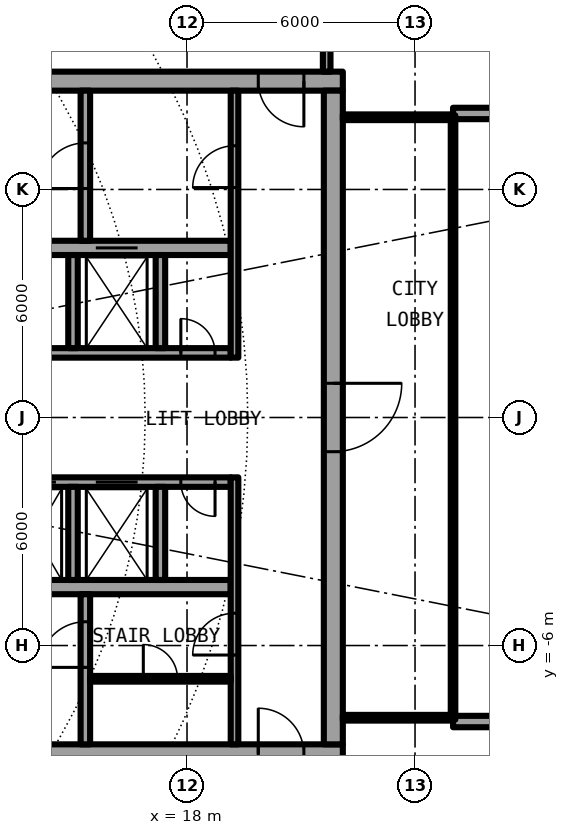
"""IFC4 building model, lengths in metres.
Left out: names, types, materials, properties, quantities, classifications, styles, units other than length and angle.
Written with IfcOpenShell. Run it as: python <this file> out.ifc"""

import sys

from ifc_helpers import new_model, si_unit, direction, frame, frame_2d, origin, place, context, subcontext, project, spatial, rectangle, extrude, element, fill, save


model = new_model("IFC4")
c1 = context("Model", 3, precision=1e-05, world=origin(), true_north=direction((0.0, 1.0)))
c2 = subcontext(c1, "Body", "Model", "MODEL_VIEW")
j1 = project(units=[si_unit("LENGTHUNIT", "METRE"), si_unit("PLANEANGLEUNIT", "RADIAN")], contexts=[c1])
p1 = place(None, origin())
s1 = spatial("IfcSite", under=j1, at=p1, CompositionType="ELEMENT")
p2 = place(p1, origin())
s2 = spatial("IfcBuilding", under=s1, at=p2, CompositionType="ELEMENT")
p3 = place(p2, frame((0.0, 0.0, 170.75)))
s3 = spatial("IfcBuildingStorey", under=s2, at=p3, CompositionType="ELEMENT", Elevation=170.75)
for number, where, z_axis, x_axis in (
    (1, (25.0, 8.0, 0.0), (0.0, 0.0, 1.0), (1.0, 0.0, 0.0)),
    (2, (25.0, -8.0, 0.0), (0.0, 0.0, 1.0), (1.0, 0.0, 0.0)),
):
    element("IfcWall", number, at=place(p3, frame(where, z_axis=z_axis, x_axis=x_axis)), inside=s3, PredefinedType="SOLIDWALL", context=c2, shape_type="SweptSolid", body=[
        extrude(rectangle(XDim=2.667, YDim=0.3, at=frame_2d((1.333, 0.0))), origin(), (0.0, 0.0, 1.0), 2.7),
    ])
p4 = place(p3, frame((22.1, 8.85, 0.0), z_axis=(0.0, 0.0, 1.0), x_axis=(-1.0, 0.0, 0.0)))
e3 = element("IfcWall", 3, at=p4, inside=s3, PredefinedType="SHEAR", context=c2, shape_type="SweptSolid", body=[
    extrude(rectangle(XDim=13.6, YDim=0.5, at=frame_2d((6.8, 0.0))), origin(), (0.0, 0.0, 1.0), 3.05),
])
p5 = place(p4, frame((1.025, 0.0, 0.0)))
e4 = element("IfcOpeningElement", 4, at=p5, cuts=e3, PredefinedType="OPENING", context=c2, shape_type="SweptSolid", body=[
    extrude(rectangle(XDim=1.2, YDim=2.3, at=frame_2d((0.6, 1.15))), frame((0.0, 0.26, 0.0), z_axis=(0.0, -1.0, 0.0), x_axis=(1.0, 0.0, 0.0)), (0.0, 0.0, 1.0), 0.52),
])
p6 = place(p3, frame((8.5, -8.85, 0.0), z_axis=(0.0, 0.0, 1.0), x_axis=(1.0, 0.0, 0.0)))
e5 = element("IfcWall", 5, at=p6, inside=s3, PredefinedType="SHEAR", context=c2, shape_type="SweptSolid", body=[
    extrude(rectangle(XDim=13.6, YDim=0.5, at=frame_2d((6.8, 0.0))), origin(), (0.0, 0.0, 1.0), 3.05),
])
p7 = place(p6, frame((11.375, 0.0, 0.0)))
e6 = element("IfcOpeningElement", 6, at=p7, cuts=e5, PredefinedType="OPENING", context=c2, shape_type="SweptSolid", body=[
    extrude(rectangle(XDim=1.2, YDim=2.3, at=frame_2d((0.6, 1.15))), frame((0.0, 0.26, 0.0), z_axis=(0.0, -1.0, 0.0), x_axis=(1.0, 0.0, 0.0)), (0.0, 0.0, 1.0), 0.52),
])
p8 = place(p3, frame((21.85, 8.6, 0.0), z_axis=(0.0, 0.0, 1.0), x_axis=(0.0, -1.0, 0.0)))
e7 = element("IfcWall", 7, at=p8, inside=s3, PredefinedType="SHEAR", context=c2, shape_type="SweptSolid", body=[
    extrude(rectangle(XDim=17.2, YDim=0.5, at=frame_2d((8.6, 0.0))), origin(), (0.0, 0.0, 1.0), 3.05),
])
p9 = place(p8, frame((7.7, 0.0, 0.0)))
e8 = element("IfcOpeningElement", 8, at=p9, cuts=e7, PredefinedType="OPENING", context=c2, shape_type="SweptSolid", body=[
    extrude(rectangle(XDim=1.8, YDim=2.3, at=frame_2d((0.9, 1.15))), frame((0.0, 0.26, 0.0), z_axis=(0.0, -1.0, 0.0), x_axis=(1.0, 0.0, 0.0)), (0.0, 0.0, 1.0), 0.52),
])
p10 = place(p3, frame((9.0, 1.7, 0.0), z_axis=(0.0, 0.0, 1.0), x_axis=(1.0, 0.0, 0.0)))
e9 = element("IfcWall", 9, at=p10, inside=s3, PredefinedType="SHEAR", context=c2, shape_type="SweptSolid", body=[
    extrude(rectangle(XDim=10.15, YDim=0.25, at=frame_2d((5.075, 0.0))), origin(), (0.0, 0.0, 1.0), 3.05),
])
p11 = place(p10, frame((1.312, 0.0, 0.0)))
e10 = element("IfcOpeningElement", 10, at=p11, cuts=e9, PredefinedType="OPENING", context=c2, shape_type="SweptSolid", body=[
    extrude(rectangle(XDim=0.9, YDim=2.3, at=frame_2d((0.45, 1.15))), frame((0.0, 0.135, 0.0), z_axis=(0.0, -1.0, 0.0), x_axis=(1.0, 0.0, 0.0)), (0.0, 0.0, 1.0), 0.27),
])
p12 = place(p10, frame((4.325, 0.0, 0.0)))
e11 = element("IfcOpeningElement", 11, at=p12, cuts=e9, PredefinedType="OPENING", context=c2, shape_type="SweptSolid", body=[
    extrude(rectangle(XDim=0.9, YDim=2.3, at=frame_2d((0.45, 1.15))), frame((0.0, 0.135, 0.0), z_axis=(0.0, -1.0, 0.0), x_axis=(1.0, 0.0, 0.0)), (0.0, 0.0, 1.0), 0.27),
])
p13 = place(p10, frame((8.837, 0.0, 0.0)))
e12 = element("IfcOpeningElement", 12, at=p13, cuts=e9, PredefinedType="OPENING", context=c2, shape_type="SweptSolid", body=[
    extrude(rectangle(XDim=0.9, YDim=2.3, at=frame_2d((0.45, 1.15))), frame((0.0, 0.135, 0.0), z_axis=(0.0, -1.0, 0.0), x_axis=(1.0, 0.0, 0.0)), (0.0, 0.0, 1.0), 0.27),
])
p14 = place(p3, frame((9.0, 4.462, 0.0), z_axis=(0.0, 0.0, 1.0), x_axis=(1.0, 0.0, 0.0)))
e13 = element("IfcWall", 13, at=p14, inside=s3, PredefinedType="SHEAR", context=c2, shape_type="SweptSolid", body=[
    extrude(rectangle(XDim=10.15, YDim=0.375, at=frame_2d((5.075, 0.0))), origin(), (0.0, 0.0, 1.0), 3.05),
])
p15 = place(p14, frame((6.6, 0.0, 0.0)))
e14 = element("IfcOpeningElement", 14, at=p15, cuts=e13, PredefinedType="OPENING", context=c2, shape_type="SweptSolid", body=[
    extrude(rectangle(XDim=1.1, YDim=2.3, at=frame_2d((0.55, 1.15))), frame((0.0, 0.198, 0.0), z_axis=(0.0, -1.0, 0.0), x_axis=(1.0, 0.0, 0.0)), (0.0, 0.0, 1.0), 0.395),
])
p16 = place(p3, frame((15.325, 4.65, 0.0), z_axis=(0.0, 0.0, 1.0), x_axis=(0.0, 1.0, 0.0)))
e15 = element("IfcWall", 15, at=p16, inside=s3, PredefinedType="SHEAR", context=c2, shape_type="SweptSolid", body=[
    extrude(rectangle(XDim=3.95, YDim=0.25, at=frame_2d((1.975, 0.0))), origin(), (0.0, 0.0, 1.0), 3.05),
])
p17 = place(p16, frame((1.375, 0.0, 0.0)))
e16 = element("IfcOpeningElement", 16, at=p17, cuts=e15, PredefinedType="OPENING", context=c2, shape_type="SweptSolid", body=[
    extrude(rectangle(XDim=1.2, YDim=2.3, at=frame_2d((0.6, 1.15))), frame((0.0, 0.135, 0.0), z_axis=(0.0, -1.0, 0.0), x_axis=(1.0, 0.0, 0.0)), (0.0, 0.0, 1.0), 0.27),
])
for number, where, z_axis, x_axis in (
    (17, (15.0, 1.825, 0.0), (0.0, 0.0, 1.0), (0.0, 1.0, 0.0)),
    (18, (17.3, 1.825, 0.0), (0.0, 0.0, 1.0), (0.0, 1.0, 0.0)),
):
    element("IfcWall", number, at=place(p3, frame(where, z_axis=z_axis, x_axis=x_axis)), inside=s3, PredefinedType="SOLIDWALL", context=c2, shape_type="SweptSolid", body=[
        extrude(rectangle(XDim=2.45, YDim=0.25, at=frame_2d((1.225, 0.0))), origin(), (0.0, 0.0, 1.0), 2.7),
    ])
p18 = place(p3, frame((19.25, 1.575, 0.0), z_axis=(0.0, 0.0, 1.0), x_axis=(0.0, 1.0, 0.0)))
e19 = element("IfcWall", 19, at=p18, inside=s3, PredefinedType="SOLIDWALL", context=c2, shape_type="SweptSolid", body=[
    extrude(rectangle(XDim=7.025, YDim=0.2, at=frame_2d((3.513, 0.0))), origin(), (0.0, 0.0, 1.0), 2.7),
])
p19 = place(p18, frame((4.475, 0.0, 0.0)))
e20 = element("IfcOpeningElement", 20, at=p19, cuts=e19, PredefinedType="OPENING", context=c2, shape_type="SweptSolid", body=[
    extrude(rectangle(XDim=1.1, YDim=2.3, at=frame_2d((0.55, 1.15))), frame((0.0, 0.11, 0.0), z_axis=(0.0, -1.0, 0.0), x_axis=(1.0, 0.0, 0.0)), (0.0, 0.0, 1.0), 0.22),
])
p20 = place(p3, frame((19.15, -1.7, 0.0), z_axis=(0.0, 0.0, 1.0), x_axis=(-1.0, 0.0, 0.0)))
e21 = element("IfcWall", 21, at=p20, inside=s3, PredefinedType="SHEAR", context=c2, shape_type="SweptSolid", body=[
    extrude(rectangle(XDim=10.15, YDim=0.25, at=frame_2d((5.075, 0.0))), origin(), (0.0, 0.0, 1.0), 3.05),
])
p21 = place(p20, frame((8.663, 0.0, 0.0)))
e22 = element("IfcOpeningElement", 22, at=p21, cuts=e21, PredefinedType="OPENING", context=c2, shape_type="SweptSolid", body=[
    extrude(rectangle(XDim=1.1, YDim=2.3, at=frame_2d((0.55, 1.15))), frame((0.0, 0.135, 0.0), z_axis=(0.0, -1.0, 0.0), x_axis=(1.0, 0.0, 0.0)), (0.0, 0.0, 1.0), 0.27),
])
p22 = place(p20, frame((6.6, 0.0, 0.0)))
e23 = element("IfcOpeningElement", 23, at=p22, cuts=e21, PredefinedType="OPENING", context=c2, shape_type="SweptSolid", body=[
    extrude(rectangle(XDim=1.1, YDim=2.3, at=frame_2d((0.55, 1.15))), frame((0.0, 0.135, 0.0), z_axis=(0.0, -1.0, 0.0), x_axis=(1.0, 0.0, 0.0)), (0.0, 0.0, 1.0), 0.27),
])
p23 = place(p20, frame((4.6, 0.0, 0.0)))
e24 = element("IfcOpeningElement", 24, at=p23, cuts=e21, PredefinedType="OPENING", context=c2, shape_type="SweptSolid", body=[
    extrude(rectangle(XDim=1.1, YDim=2.3, at=frame_2d((0.55, 1.15))), frame((0.0, 0.135, 0.0), z_axis=(0.0, -1.0, 0.0), x_axis=(1.0, 0.0, 0.0)), (0.0, 0.0, 1.0), 0.27),
])
p24 = place(p20, frame((2.45, 0.0, 0.0)))
e25 = element("IfcOpeningElement", 25, at=p24, cuts=e21, PredefinedType="OPENING", context=c2, shape_type="SweptSolid", body=[
    extrude(rectangle(XDim=1.1, YDim=2.3, at=frame_2d((0.55, 1.15))), frame((0.0, 0.135, 0.0), z_axis=(0.0, -1.0, 0.0), x_axis=(1.0, 0.0, 0.0)), (0.0, 0.0, 1.0), 0.27),
])
p25 = place(p20, frame((0.413, 0.0, 0.0)))
e26 = element("IfcOpeningElement", 26, at=p25, cuts=e21, PredefinedType="OPENING", context=c2, shape_type="SweptSolid", body=[
    extrude(rectangle(XDim=0.9, YDim=2.3, at=frame_2d((0.45, 1.15))), frame((0.0, 0.135, 0.0), z_axis=(0.0, -1.0, 0.0), x_axis=(1.0, 0.0, 0.0)), (0.0, 0.0, 1.0), 0.27),
])
p26 = place(p3, frame((9.0, -4.462, 0.0), z_axis=(0.0, 0.0, 1.0), x_axis=(1.0, 0.0, 0.0)))
e27 = element("IfcWall", 27, at=p26, inside=s3, PredefinedType="SHEAR", context=c2, shape_type="SweptSolid", body=[
    extrude(rectangle(XDim=10.15, YDim=0.375, at=frame_2d((5.075, 0.0))), origin(), (0.0, 0.0, 1.0), 3.05),
])
p27 = place(p3, frame((15.325, -8.6, 0.0), z_axis=(0.0, 0.0, 1.0), x_axis=(0.0, 1.0, 0.0)))
e28 = element("IfcWall", 28, at=p27, inside=s3, PredefinedType="SHEAR", context=c2, shape_type="SweptSolid", body=[
    extrude(rectangle(XDim=3.95, YDim=0.25, at=frame_2d((1.975, 0.0))), origin(), (0.0, 0.0, 1.0), 3.05),
])
p28 = place(p27, frame((2.025, 0.0, 0.0)))
e29 = element("IfcOpeningElement", 29, at=p28, cuts=e28, PredefinedType="OPENING", context=c2, shape_type="SweptSolid", body=[
    extrude(rectangle(XDim=1.2, YDim=2.3, at=frame_2d((0.6, 1.15))), frame((0.0, 0.135, 0.0), z_axis=(0.0, -1.0, 0.0), x_axis=(1.0, 0.0, 0.0)), (0.0, 0.0, 1.0), 0.27),
])
for number, where, z_axis, x_axis in (
    (30, (15.0, -1.825, 0.0), (0.0, 0.0, 1.0), (0.0, -1.0, 0.0)),
    (31, (17.3, -1.825, 0.0), (0.0, 0.0, 1.0), (0.0, -1.0, 0.0)),
):
    element("IfcWall", number, at=place(p3, frame(where, z_axis=z_axis, x_axis=x_axis)), inside=s3, PredefinedType="SOLIDWALL", context=c2, shape_type="SweptSolid", body=[
        extrude(rectangle(XDim=2.45, YDim=0.25, at=frame_2d((1.225, 0.0))), origin(), (0.0, 0.0, 1.0), 2.7),
    ])
p29 = place(p3, frame((19.25, -8.6, 0.0), z_axis=(0.0, 0.0, 1.0), x_axis=(0.0, 1.0, 0.0)))
e32 = element("IfcWall", 32, at=p29, inside=s3, PredefinedType="SOLIDWALL", context=c2, shape_type="SweptSolid", body=[
    extrude(rectangle(XDim=7.025, YDim=0.2, at=frame_2d((3.513, 0.0))), origin(), (0.0, 0.0, 1.0), 2.7),
])
p30 = place(p29, frame((2.35, 0.0, 0.0)))
e33 = element("IfcOpeningElement", 33, at=p30, cuts=e32, PredefinedType="OPENING", context=c2, shape_type="SweptSolid", body=[
    extrude(rectangle(XDim=1.1, YDim=2.3, at=frame_2d((0.55, 1.15))), frame((0.0, 0.11, 0.0), z_axis=(0.0, -1.0, 0.0), x_axis=(1.0, 0.0, 0.0)), (0.0, 0.0, 1.0), 0.22),
])
p31 = place(p3, frame((15.45, -6.875, 0.0), z_axis=(0.0, 0.0, 1.0), x_axis=(1.0, 0.0, 0.0)))
e34 = element("IfcWall", 34, at=p31, inside=s3, PredefinedType="PARTITIONING", context=c2, shape_type="SweptSolid", body=[
    extrude(rectangle(XDim=3.7, YDim=0.15, at=frame_2d((1.85, 0.0))), origin(), (0.0, 0.0, 1.0), 2.7),
])
p32 = place(p31, frame((1.4, 0.0, 0.0)))
e35 = element("IfcOpeningElement", 35, at=p32, cuts=e34, PredefinedType="OPENING", context=c2, shape_type="SweptSolid", body=[
    extrude(rectangle(XDim=0.9, YDim=2.3, at=frame_2d((0.45, 1.15))), frame((0.0, 0.085, 0.0), z_axis=(0.0, -1.0, 0.0), x_axis=(1.0, 0.0, 0.0)), (0.0, 0.0, 1.0), 0.17),
])
for number, where, z_axis, x_axis in (
    (36, (22.1, -7.9, 0.0), (0.0, 0.0, 1.0), (1.0, 0.0, 0.0)),
    (37, (22.1, 7.9, 0.0), (0.0, 0.0, 1.0), (1.0, 0.0, 0.0)),
):
    element("IfcWall", number, at=place(p3, frame(where, z_axis=z_axis, x_axis=x_axis)), inside=s3, PredefinedType="PARTITIONING", context=c2, shape_type="SweptSolid", body=[
        extrude(rectangle(XDim=2.84, YDim=0.15, at=frame_2d((1.42, 0.0))), origin(), (0.0, 0.0, 1.0), 2.7),
    ])
p33 = place(p3, frame((25.0, -7.95, 0.0), z_axis=(0.0, 0.0, 1.0), x_axis=(0.0, 1.0, 0.0)))
e38 = element("IfcWall", 38, at=p33, inside=s3, PredefinedType="PARTITIONING", context=c2, shape_type="SweptSolid", body=[
    extrude(rectangle(XDim=15.9, YDim=0.12, at=frame_2d((7.95, 0.0))), origin(), (0.0, 0.0, 1.0), 2.7),
])
p34 = place(p33, frame((0.95, 0.0, 0.1)))
e39 = element("IfcOpeningElement", 39, at=p34, cuts=e38, PredefinedType="OPENING", context=c2, shape_type="SweptSolid", body=[
    extrude(rectangle(XDim=14.0, YDim=2.35, at=frame_2d((7.0, 1.175))), frame((0.0, 0.07, 0.0), z_axis=(0.0, -1.0, 0.0), x_axis=(1.0, 0.0, 0.0)), (0.0, 0.0, 1.0), 0.14),
])
p35 = place(p3, frame((21.675, 9.1, 0.0), z_axis=(0.0, 0.0, 1.0), x_axis=(0.0, 1.0, 0.0)))
e40 = element("IfcWall", 40, at=p35, inside=s3, PredefinedType="PARTITIONING", context=c2, shape_type="SweptSolid", body=[
    extrude(rectangle(XDim=1.75, YDim=0.2, at=frame_2d((0.875, 0.0))), origin(), (0.0, 0.0, 1.0), 2.7),
])
p36 = place(p15, origin())
e41 = element("IfcDoor", 41, at=p36, inside=s3, OperationType="DOUBLE_DOOR_SLIDING", PredefinedType="DOOR", context=c2, shape_type="SweptSolid", body=[
    extrude(rectangle(XDim=1.1, YDim=2.3, at=frame_2d((0.55, 1.15))), frame((0.0, 0.025, 0.0), z_axis=(0.0, -1.0, 0.0), x_axis=(1.0, 0.0, 0.0)), (0.0, 0.0, 1.0), 0.05),
])
fill(e14, e41)
p37 = place(p23, origin())
e42 = element("IfcDoor", 42, at=p37, inside=s3, OperationType="DOUBLE_DOOR_SLIDING", PredefinedType="DOOR", context=c2, shape_type="SweptSolid", body=[
    extrude(rectangle(XDim=1.1, YDim=2.3, at=frame_2d((0.55, 1.15))), frame((0.0, 0.025, 0.0), z_axis=(0.0, -1.0, 0.0), x_axis=(1.0, 0.0, 0.0)), (0.0, 0.0, 1.0), 0.05),
])
fill(e24, e42)
p38 = place(p24, origin())
e43 = element("IfcDoor", 43, at=p38, inside=s3, OperationType="DOUBLE_DOOR_SLIDING", PredefinedType="DOOR", context=c2, shape_type="SweptSolid", body=[
    extrude(rectangle(XDim=1.1, YDim=2.3, at=frame_2d((0.55, 1.15))), frame((0.0, 0.025, 0.0), z_axis=(0.0, -1.0, 0.0), x_axis=(1.0, 0.0, 0.0)), (0.0, 0.0, 1.0), 0.05),
])
fill(e25, e43)
p39 = place(p13, origin())
e44 = element("IfcDoor", 44, at=p39, inside=s3, OperationType="SINGLE_SWING_LEFT", PredefinedType="DOOR", context=c2, shape_type="SweptSolid", body=[
    extrude(rectangle(XDim=0.9, YDim=2.3, at=frame_2d((0.45, 1.15))), frame((0.0, 0.025, 0.0), z_axis=(0.0, -1.0, 0.0), x_axis=(1.0, 0.0, 0.0)), (0.0, 0.0, 1.0), 0.05),
])
fill(e12, e44)
p40 = place(p25, origin())
e45 = element("IfcDoor", 45, at=p40, inside=s3, OperationType="SINGLE_SWING_RIGHT", PredefinedType="DOOR", context=c2, shape_type="SweptSolid", body=[
    extrude(rectangle(XDim=0.9, YDim=2.3, at=frame_2d((0.45, 1.15))), frame((0.0, 0.025, 0.0), z_axis=(0.0, -1.0, 0.0), x_axis=(1.0, 0.0, 0.0)), (0.0, 0.0, 1.0), 0.05),
])
fill(e26, e45)
p41 = place(p32, origin())
e46 = element("IfcDoor", 46, at=p41, inside=s3, OperationType="SINGLE_SWING_LEFT", PredefinedType="DOOR", context=c2, shape_type="SweptSolid", body=[
    extrude(rectangle(XDim=0.9, YDim=2.3, at=frame_2d((0.45, 1.15))), frame((0.0, 0.025, 0.0), z_axis=(0.0, -1.0, 0.0), x_axis=(1.0, 0.0, 0.0)), (0.0, 0.0, 1.0), 0.05),
])
fill(e35, e46)
p42 = place(p17, origin())
e47 = element("IfcDoor", 47, at=p42, inside=s3, OperationType="SINGLE_SWING_LEFT", PredefinedType="DOOR", context=c2, shape_type="SweptSolid", body=[
    extrude(rectangle(XDim=1.2, YDim=2.3, at=frame_2d((0.6, 1.15))), frame((0.0, 0.025, 0.0), z_axis=(0.0, -1.0, 0.0), x_axis=(1.0, 0.0, 0.0)), (0.0, 0.0, 1.0), 0.05),
])
fill(e16, e47)
p43 = place(p28, origin())
e48 = element("IfcDoor", 48, at=p43, inside=s3, OperationType="SINGLE_SWING_LEFT", PredefinedType="DOOR", context=c2, shape_type="SweptSolid", body=[
    extrude(rectangle(XDim=1.2, YDim=2.3, at=frame_2d((0.6, 1.15))), frame((0.0, 0.025, 0.0), z_axis=(0.0, -1.0, 0.0), x_axis=(1.0, 0.0, 0.0)), (0.0, 0.0, 1.0), 0.05),
])
fill(e29, e48)
p44 = place(p19, origin())
e49 = element("IfcDoor", 49, at=p44, inside=s3, OperationType="SINGLE_SWING_LEFT", PredefinedType="DOOR", context=c2, shape_type="SweptSolid", body=[
    extrude(rectangle(XDim=1.1, YDim=2.3, at=frame_2d((0.55, 1.15))), frame((0.0, 0.025, 0.0), z_axis=(0.0, -1.0, 0.0), x_axis=(1.0, 0.0, 0.0)), (0.0, 0.0, 1.0), 0.05),
])
fill(e20, e49)
p45 = place(p30, origin())
e50 = element("IfcDoor", 50, at=p45, inside=s3, OperationType="SINGLE_SWING_RIGHT", PredefinedType="DOOR", context=c2, shape_type="SweptSolid", body=[
    extrude(rectangle(XDim=1.1, YDim=2.3, at=frame_2d((0.55, 1.15))), frame((0.0, 0.025, 0.0), z_axis=(0.0, -1.0, 0.0), x_axis=(1.0, 0.0, 0.0)), (0.0, 0.0, 1.0), 0.05),
])
fill(e33, e50)
p46 = place(p5, origin())
e51 = element("IfcDoor", 51, at=p46, inside=s3, OperationType="SINGLE_SWING_RIGHT", PredefinedType="DOOR", context=c2, shape_type="SweptSolid", body=[
    extrude(rectangle(XDim=1.2, YDim=2.3, at=frame_2d((0.6, 1.15))), frame((0.0, 0.025, 0.0), z_axis=(0.0, -1.0, 0.0), x_axis=(1.0, 0.0, 0.0)), (0.0, 0.0, 1.0), 0.05),
])
fill(e4, e51)
p47 = place(p7, origin())
e52 = element("IfcDoor", 52, at=p47, inside=s3, OperationType="SINGLE_SWING_LEFT", PredefinedType="DOOR", context=c2, shape_type="SweptSolid", body=[
    extrude(rectangle(XDim=1.2, YDim=2.3, at=frame_2d((0.6, 1.15))), frame((0.0, 0.025, 0.0), z_axis=(0.0, -1.0, 0.0), x_axis=(1.0, 0.0, 0.0)), (0.0, 0.0, 1.0), 0.05),
])
fill(e6, e52)
p48 = place(p9, origin())
e53 = element("IfcDoor", 53, at=p48, inside=s3, OperationType="SINGLE_SWING_LEFT", PredefinedType="DOOR", context=c2, shape_type="SweptSolid", body=[
    extrude(rectangle(XDim=1.8, YDim=2.3, at=frame_2d((0.9, 1.15))), frame((0.0, 0.025, 0.0), z_axis=(0.0, -1.0, 0.0), x_axis=(1.0, 0.0, 0.0)), (0.0, 0.0, 1.0), 0.05),
])
fill(e8, e53)
p49 = place(p34, origin())
e54 = element("IfcWindow", 54, at=p49, inside=s3, PartitioningType="SINGLE_PANEL", PredefinedType="WINDOW", context=c2, shape_type="SweptSolid", body=[
    extrude(rectangle(XDim=14.0, YDim=2.35, at=frame_2d((7.0, 1.175))), frame((0.0, 0.03, 0.0), z_axis=(0.0, -1.0, 0.0), x_axis=(1.0, 0.0, 0.0)), (0.0, 0.0, 1.0), 0.06),
])
fill(e39, e54)
save(model, sys.argv[1])
